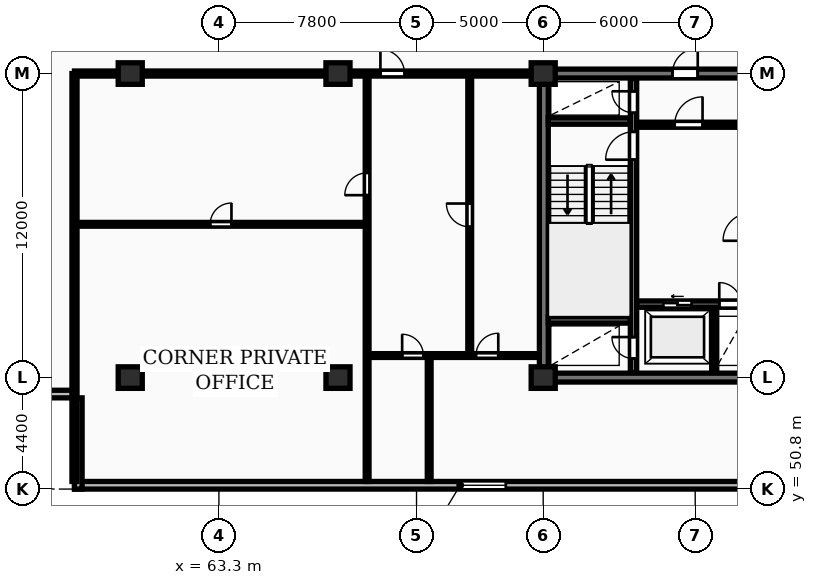
"""IFC4 building model, lengths in metres.
Left out: names, types, materials, properties, quantities, classifications, styles, units other than length and angle.
Written with IfcOpenShell. Run it as: python <this file> out.ifc"""

import sys

from ifc_helpers import new_model, si_unit, direction, frame, frame_2d, origin, origin_2d, place, context, subcontext, project, spatial, rectangle, extrude, element, fill, save


model = new_model("IFC4")
c1 = context("Model", 3, precision=1e-05, world=origin(), true_north=direction((0.0, 1.0)))
c2 = subcontext(c1, "Body", "Model", "MODEL_VIEW")
j1 = project(units=[si_unit("LENGTHUNIT", "METRE"), si_unit("PLANEANGLEUNIT", "RADIAN")], contexts=[c1])
p1 = place(None, origin())
s1 = spatial("IfcSite", under=j1, at=p1, CompositionType="ELEMENT")
p2 = place(p1, origin())
s2 = spatial("IfcBuilding", under=s1, at=p2, CompositionType="ELEMENT")
p3 = place(p2, frame((0.0, 0.0, 113.3)))
s3 = spatial("IfcBuildingStorey", under=s2, at=p3, CompositionType="ELEMENT", Elevation=113.3)
for number, where, z_axis, x_axis in (
    (1, (59.8, 55.2, 0.0), (0.0, 0.0, 1.0), (1.0, 0.0, 0.0)),
    (2, (59.8, 67.2, 0.0), (0.0, 0.0, 1.0), (1.0, 0.0, 0.0)),
    (3, (68.0, 55.2, 0.0), (0.0, 0.0, 1.0), (1.0, 0.0, 0.0)),
    (4, (68.0, 67.2, 0.0), (0.0, 0.0, 1.0), (1.0, 0.0, 0.0)),
    (5, (76.1, 55.2, 0.0), (0.0, 0.0, 1.0), (1.0, 0.0, 0.0)),
    (6, (76.1, 67.2, 0.0), (0.0, 0.0, 1.0), (1.0, 0.0, 0.0)),
):
    element("IfcColumn", number, at=place(p3, frame(where, z_axis=z_axis, x_axis=x_axis)), inside=s3, PredefinedType="COLUMN", context=c2, shape_type="SweptSolid", body=[
        extrude(rectangle(XDim=0.95, YDim=0.85, at=origin_2d()), origin(), (0.0, 0.0, 1.0), 3.25),
    ])
p4 = place(p3, frame((57.6, 50.95, 0.0), z_axis=(0.0, 0.0, 1.0), x_axis=(1.0, 0.0, 0.0)))
e7 = element("IfcWall", 7, at=p4, inside=s3, PredefinedType="STANDARD", context=c2, shape_type="SweptSolid", body=[
    extrude(rectangle(XDim=73.0, YDim=0.3, at=frame_2d((36.5, 0.0))), origin(), (0.0, 0.0, 1.0), 2.97),
])
p5 = place(p4, frame((15.225, 0.0, 0.85)))
e8 = element("IfcOpeningElement", 8, at=p5, cuts=e7, PredefinedType="OPENING", context=c2, shape_type="SweptSolid", body=[
    extrude(rectangle(XDim=1.8, YDim=1.8, at=frame_2d((0.9, 0.9))), frame((0.0, 0.16, 0.0), z_axis=(0.0, -1.0, 0.0), x_axis=(1.0, 0.0, 0.0)), (0.0, 0.0, 1.0), 0.32),
])
p6 = place(p4, frame((58.575, 0.0, 0.85)))
e9 = element("IfcOpeningElement", 9, at=p6, cuts=e7, PredefinedType="OPENING", context=c2, shape_type="SweptSolid", body=[
    extrude(rectangle(XDim=1.8, YDim=1.8, at=frame_2d((0.9, 0.9))), frame((0.0, 0.16, 0.0), z_axis=(0.0, -1.0, 0.0), x_axis=(1.0, 0.0, 0.0)), (0.0, 0.0, 1.0), 0.32),
])
p7 = place(p3, frame((54.0, 54.55, 0.0), z_axis=(0.0, 0.0, 1.0), x_axis=(1.0, 0.0, 0.0)))
e10 = element("IfcWall", 10, at=p7, inside=s3, PredefinedType="STANDARD", context=c2, shape_type="SweptSolid", body=[
    extrude(rectangle(XDim=3.6, YDim=0.3, at=frame_2d((1.8, 0.0))), origin(), (0.0, 0.0, 1.0), 2.97),
])
p8 = place(p3, frame((57.75, 54.4, 0.0), z_axis=(0.0, 0.0, 1.0), x_axis=(0.0, -1.0, 0.0)))
e11 = element("IfcWall", 11, at=p8, inside=s3, PredefinedType="STANDARD", context=c2, shape_type="SweptSolid", body=[
    extrude(rectangle(XDim=3.6, YDim=0.3, at=frame_2d((1.8, 0.0))), origin(), (0.0, 0.0, 1.0), 2.97),
])
p9 = place(p3, frame((75.95, 55.2, 0.0), z_axis=(0.0, 0.0, 1.0), x_axis=(1.0, 0.0, 0.0)))
e12 = element("IfcWall", 12, at=p9, inside=s3, PredefinedType="SHEAR", context=c2, shape_type="SweptSolid", body=[
    extrude(rectangle(XDim=36.3, YDim=0.35, at=frame_2d((18.15, 0.0))), origin(), (0.0, 0.0, 1.0), 3.25),
])
p10 = place(p3, frame((76.125, 55.375, 0.0), z_axis=(0.0, 0.0, 1.0), x_axis=(0.0, 1.0, 0.0)))
e13 = element("IfcWall", 13, at=p10, inside=s3, PredefinedType="SHEAR", context=c2, shape_type="SweptSolid", body=[
    extrude(rectangle(XDim=11.65, YDim=0.35, at=frame_2d((5.825, 0.0))), origin(), (0.0, 0.0, 1.0), 3.25),
])
p11 = place(p3, frame((75.95, 67.2, 0.0), z_axis=(0.0, 0.0, 1.0), x_axis=(1.0, 0.0, 0.0)))
e14 = element("IfcWall", 14, at=p11, inside=s3, PredefinedType="SHEAR", context=c2, shape_type="SweptSolid", body=[
    extrude(rectangle(XDim=36.3, YDim=0.35, at=frame_2d((18.15, 0.0))), origin(), (0.0, 0.0, 1.0), 3.25),
])
p12 = place(p11, frame((5.25, 0.0, 0.0)))
e15 = element("IfcOpeningElement", 15, at=p12, cuts=e14, PredefinedType="OPENING", context=c2, shape_type="SweptSolid", body=[
    extrude(rectangle(XDim=1.0, YDim=2.15, at=frame_2d((0.5, 1.075))), frame((0.0, 0.185, 0.0), z_axis=(0.0, -1.0, 0.0), x_axis=(1.0, 0.0, 0.0)), (0.0, 0.0, 1.0), 0.37),
])
p13 = place(p11, frame((21.6, 0.0, 0.0)))
e16 = element("IfcOpeningElement", 16, at=p13, cuts=e14, PredefinedType="OPENING", context=c2, shape_type="SweptSolid", body=[
    extrude(rectangle(XDim=1.5, YDim=2.2, at=frame_2d((0.75, 1.1))), frame((0.0, 0.185, 0.0), z_axis=(0.0, -1.0, 0.0), x_axis=(1.0, 0.0, 0.0)), (0.0, 0.0, 1.0), 0.37),
])
p14 = place(p11, frame((30.45, 0.0, 0.0)))
e17 = element("IfcOpeningElement", 17, at=p14, cuts=e14, PredefinedType="OPENING", context=c2, shape_type="SweptSolid", body=[
    extrude(rectangle(XDim=1.0, YDim=2.15, at=frame_2d((0.5, 1.075))), frame((0.0, 0.185, 0.0), z_axis=(0.0, -1.0, 0.0), x_axis=(1.0, 0.0, 0.0)), (0.0, 0.0, 1.0), 0.37),
])
p15 = place(p3, frame((79.665, 55.4, 0.0), z_axis=(0.0, 0.0, 1.0), x_axis=(0.0, 1.0, 0.0)))
e18 = element("IfcWall", 18, at=p15, inside=s3, PredefinedType="SHEAR", context=c2, shape_type="SweptSolid", body=[
    extrude(rectangle(XDim=11.6, YDim=0.25, at=frame_2d((5.8, 0.0))), origin(), (0.0, 0.0, 1.0), 3.25),
])
p16 = place(p15, frame((0.55, 0.0, 0.0)))
e19 = element("IfcOpeningElement", 19, at=p16, cuts=e18, PredefinedType="OPENING", context=c2, shape_type="SweptSolid", body=[
    extrude(rectangle(XDim=0.85, YDim=2.05, at=frame_2d((0.425, 1.025))), frame((0.0, 0.135, 0.0), z_axis=(0.0, -1.0, 0.0), x_axis=(1.0, 0.0, 0.0)), (0.0, 0.0, 1.0), 0.27),
])
p17 = place(p15, frame((8.4, 0.0, 0.0)))
e20 = element("IfcOpeningElement", 20, at=p17, cuts=e18, PredefinedType="OPENING", context=c2, shape_type="SweptSolid", body=[
    extrude(rectangle(XDim=1.1, YDim=2.1, at=frame_2d((0.55, 1.05))), frame((0.0, 0.135, 0.0), z_axis=(0.0, -1.0, 0.0), x_axis=(1.0, 0.0, 0.0)), (0.0, 0.0, 1.0), 0.27),
])
p18 = place(p15, frame((10.25, 0.0, 0.0)))
e21 = element("IfcOpeningElement", 21, at=p18, cuts=e18, PredefinedType="OPENING", context=c2, shape_type="SweptSolid", body=[
    extrude(rectangle(XDim=0.85, YDim=2.05, at=frame_2d((0.425, 1.025))), frame((0.0, 0.135, 0.0), z_axis=(0.0, -1.0, 0.0), x_axis=(1.0, 0.0, 0.0)), (0.0, 0.0, 1.0), 0.27),
])
for number, where, z_axis, x_axis in (
    (22, (76.3, 57.475, 0.0), (0.0, 0.0, 1.0), (1.0, 0.0, 0.0)),
    (23, (76.3, 65.325, 0.0), (0.0, 0.0, 1.0), (1.0, 0.0, 0.0)),
):
    element("IfcWall", number, at=place(p3, frame(where, z_axis=z_axis, x_axis=x_axis)), inside=s3, PredefinedType="SHEAR", context=c2, shape_type="SweptSolid", body=[
        extrude(rectangle(XDim=3.24, YDim=0.25, at=frame_2d((1.62, 0.0))), origin(), (0.0, 0.0, 1.0), 3.25),
    ])
p19 = place(p3, frame((79.79, 58.1, 0.0), z_axis=(0.0, 0.0, 1.0), x_axis=(1.0, 0.0, 0.0)))
e24 = element("IfcWall", 24, at=p19, inside=s3, PredefinedType="SHEAR", context=c2, shape_type="SweptSolid", body=[
    extrude(rectangle(XDim=4.39, YDim=0.25, at=frame_2d((2.195, 0.0))), origin(), (0.0, 0.0, 1.0), 3.25),
])
p20 = place(p19, frame((1.05, 0.0, 0.0)))
e25 = element("IfcOpeningElement", 25, at=p20, cuts=e24, PredefinedType="OPENING", context=c2, shape_type="SweptSolid", body=[
    extrude(rectangle(XDim=1.12, YDim=2.12, at=frame_2d((0.56, 1.06))), frame((0.0, 0.135, 0.0), z_axis=(0.0, -1.0, 0.0), x_axis=(1.0, 0.0, 0.0)), (0.0, 0.0, 1.0), 0.27),
])
p21 = place(p19, frame((3.26, 0.0, 0.0)))
e26 = element("IfcOpeningElement", 26, at=p21, cuts=e24, PredefinedType="OPENING", context=c2, shape_type="SweptSolid", body=[
    extrude(rectangle(XDim=0.85, YDim=2.05, at=frame_2d((0.425, 1.025))), frame((0.0, 0.135, 0.0), z_axis=(0.0, -1.0, 0.0), x_axis=(1.0, 0.0, 0.0)), (0.0, 0.0, 1.0), 0.27),
])
p22 = place(p3, frame((82.85, 55.4, 0.0), z_axis=(0.0, 0.0, 1.0), x_axis=(0.0, 1.0, 0.0)))
e27 = element("IfcWall", 27, at=p22, inside=s3, PredefinedType="PARTITIONING", context=c2, shape_type="SweptSolid", body=[
    extrude(rectangle(XDim=2.56, YDim=0.2, at=frame_2d((1.28, 0.0))), origin(), (0.0, 0.0, 1.0), 2.97),
])
p23 = place(p3, frame((79.79, 65.18, 0.0), z_axis=(0.0, 0.0, 1.0), x_axis=(1.0, 0.0, 0.0)))
e28 = element("IfcWall", 28, at=p23, inside=s3, PredefinedType="PARTITIONING", context=c2, shape_type="SweptSolid", body=[
    extrude(rectangle(XDim=4.39, YDim=0.2, at=frame_2d((2.195, 0.0))), origin(), (0.0, 0.0, 1.0), 2.97),
])
p24 = place(p23, frame((1.5, 0.0, 0.0)))
e29 = element("IfcOpeningElement", 29, at=p24, cuts=e28, PredefinedType="OPENING", context=c2, shape_type="SweptSolid", body=[
    extrude(rectangle(XDim=1.1, YDim=2.1, at=frame_2d((0.55, 1.05))), frame((0.0, 0.11, 0.0), z_axis=(0.0, -1.0, 0.0), x_axis=(1.0, 0.0, 0.0)), (0.0, 0.0, 1.0), 0.22),
])
p25 = place(p3, frame((57.6, 51.1, 0.0), z_axis=(0.0, 0.0, 1.0), x_axis=(0.0, 1.0, 0.0)))
e30 = element("IfcWall", 30, at=p25, inside=s3, PredefinedType="PARTITIONING", context=c2, shape_type="SweptSolid", body=[
    extrude(rectangle(XDim=16.1, YDim=0.2, at=frame_2d((8.05, 0.0))), origin(), (0.0, 0.0, 1.0), 2.97),
])
p26 = place(p3, frame((57.6, 61.25, 0.0), z_axis=(0.0, 0.0, 1.0), x_axis=(1.0, 0.0, 0.0)))
e31 = element("IfcWall", 31, at=p26, inside=s3, PredefinedType="PARTITIONING", context=c2, shape_type="SweptSolid", body=[
    extrude(rectangle(XDim=11.55, YDim=0.15, at=frame_2d((5.775, 0.0))), origin(), (0.0, 0.0, 1.0), 2.97),
])
p27 = place(p26, frame((5.355, 0.0, 0.0)))
e32 = element("IfcOpeningElement", 32, at=p27, cuts=e31, PredefinedType="OPENING", context=c2, shape_type="SweptSolid", body=[
    extrude(rectangle(XDim=0.84, YDim=2.04, at=frame_2d((0.42, 1.02))), frame((0.0, 0.085, 0.0), z_axis=(0.0, -1.0, 0.0), x_axis=(1.0, 0.0, 0.0)), (0.0, 0.0, 1.0), 0.17),
])
p28 = place(p3, frame((69.15, 51.1, 0.0), z_axis=(0.0, 0.0, 1.0), x_axis=(0.0, 1.0, 0.0)))
e33 = element("IfcWall", 33, at=p28, inside=s3, PredefinedType="PARTITIONING", context=c2, shape_type="SweptSolid", body=[
    extrude(rectangle(XDim=16.05, YDim=0.15, at=frame_2d((8.025, 0.0))), origin(), (0.0, 0.0, 1.0), 2.97),
])
p29 = place(p28, frame((11.3, 0.0, 0.0)))
e34 = element("IfcOpeningElement", 34, at=p29, cuts=e33, PredefinedType="OPENING", context=c2, shape_type="SweptSolid", body=[
    extrude(rectangle(XDim=0.88, YDim=2.06, at=frame_2d((0.44, 1.03))), frame((0.0, 0.085, 0.0), z_axis=(0.0, -1.0, 0.0), x_axis=(1.0, 0.0, 0.0)), (0.0, 0.0, 1.0), 0.17),
])
p30 = place(p3, frame((73.2, 56.07, 0.0), z_axis=(0.0, 0.0, 1.0), x_axis=(0.0, 1.0, 0.0)))
e35 = element("IfcWall", 35, at=p30, inside=s3, PredefinedType="PARTITIONING", context=c2, shape_type="SweptSolid", body=[
    extrude(rectangle(XDim=11.08, YDim=0.15, at=frame_2d((5.54, 0.0))), origin(), (0.0, 0.0, 1.0), 2.97),
])
p31 = place(p30, frame((5.08, 0.0, 0.0)))
e36 = element("IfcOpeningElement", 36, at=p31, cuts=e35, PredefinedType="OPENING", context=c2, shape_type="SweptSolid", body=[
    extrude(rectangle(XDim=0.92, YDim=2.08, at=frame_2d((0.46, 1.04))), frame((0.0, 0.085, 0.0), z_axis=(0.0, -1.0, 0.0), x_axis=(1.0, 0.0, 0.0)), (0.0, 0.0, 1.0), 0.17),
])
p32 = place(p3, frame((71.6, 51.1, 0.0), z_axis=(0.0, 0.0, 1.0), x_axis=(0.0, 1.0, 0.0)))
e37 = element("IfcWall", 37, at=p32, inside=s3, PredefinedType="PARTITIONING", context=c2, shape_type="SweptSolid", body=[
    extrude(rectangle(XDim=4.97, YDim=0.15, at=frame_2d((2.485, 0.0))), origin(), (0.0, 0.0, 1.0), 2.97),
])
p33 = place(p3, frame((69.17, 56.07, 0.0), z_axis=(0.0, 0.0, 1.0), x_axis=(1.0, 0.0, 0.0)))
e38 = element("IfcWall", 38, at=p33, inside=s3, PredefinedType="PARTITIONING", context=c2, shape_type="SweptSolid", body=[
    extrude(rectangle(XDim=6.76, YDim=0.15, at=frame_2d((3.38, 0.0))), origin(), (0.0, 0.0, 1.0), 2.97),
])
p34 = place(p33, frame((1.362, 0.0, 0.0)))
e39 = element("IfcOpeningElement", 39, at=p34, cuts=e38, PredefinedType="OPENING", context=c2, shape_type="SweptSolid", body=[
    extrude(rectangle(XDim=0.84, YDim=2.04, at=frame_2d((0.42, 1.02))), frame((0.0, 0.085, 0.0), z_axis=(0.0, -1.0, 0.0), x_axis=(1.0, 0.0, 0.0)), (0.0, 0.0, 1.0), 0.17),
])
p35 = place(p33, frame((4.277, 0.0, 0.0)))
e40 = element("IfcOpeningElement", 40, at=p35, cuts=e38, PredefinedType="OPENING", context=c2, shape_type="SweptSolid", body=[
    extrude(rectangle(XDim=0.88, YDim=2.06, at=frame_2d((0.44, 1.03))), frame((0.0, 0.085, 0.0), z_axis=(0.0, -1.0, 0.0), x_axis=(1.0, 0.0, 0.0)), (0.0, 0.0, 1.0), 0.17),
])
p36 = place(p3, frame((57.6, 67.2, 0.0), z_axis=(0.0, 0.0, 1.0), x_axis=(1.0, 0.0, 0.0)))
e41 = element("IfcWall", 41, at=p36, inside=s3, PredefinedType="PARTITIONING", context=c2, shape_type="SweptSolid", body=[
    extrude(rectangle(XDim=18.35, YDim=0.2, at=frame_2d((9.175, 0.0))), origin(), (0.0, 0.0, 1.0), 2.433),
])
p37 = place(p36, frame((12.075, 0.0, 0.0)))
e42 = element("IfcOpeningElement", 42, at=p37, cuts=e41, PredefinedType="OPENING", context=c2, shape_type="SweptSolid", body=[
    extrude(rectangle(XDim=0.95, YDim=2.15, at=frame_2d((0.475, 1.075))), frame((0.0, 0.11, 0.0), z_axis=(0.0, -1.0, 0.0), x_axis=(1.0, 0.0, 0.0)), (0.0, 0.0, 1.0), 0.22),
])
p38 = place(p5, origin())
e43 = element("IfcWindow", 43, at=p38, inside=s3, PartitioningType="SINGLE_PANEL", PredefinedType="WINDOW", context=c2, shape_type="SweptSolid", body=[
    extrude(rectangle(XDim=1.8, YDim=1.8, at=frame_2d((0.9, 0.9))), frame((0.0, 0.03, 0.0), z_axis=(0.0, -1.0, 0.0), x_axis=(1.0, 0.0, 0.0)), (0.0, 0.0, 1.0), 0.06),
])
fill(e8, e43)
p39 = place(p12, origin())
e44 = element("IfcDoor", 44, at=p39, inside=s3, OperationType="SINGLE_SWING_RIGHT", PredefinedType="DOOR", context=c2, shape_type="SweptSolid", body=[
    extrude(rectangle(XDim=1.0, YDim=2.15, at=frame_2d((0.5, 1.075))), frame((0.0, 0.025, 0.0), z_axis=(0.0, -1.0, 0.0), x_axis=(1.0, 0.0, 0.0)), (0.0, 0.0, 1.0), 0.05),
])
fill(e15, e44)
p40 = place(p16, origin())
e45 = element("IfcDoor", 45, at=p40, inside=s3, OperationType="SINGLE_SWING_RIGHT", PredefinedType="DOOR", context=c2, shape_type="SweptSolid", body=[
    extrude(rectangle(XDim=0.85, YDim=2.05, at=frame_2d((0.425, 1.025))), frame((0.0, 0.025, 0.0), z_axis=(0.0, -1.0, 0.0), x_axis=(1.0, 0.0, 0.0)), (0.0, 0.0, 1.0), 0.05),
])
fill(e19, e45)
p41 = place(p17, origin())
e46 = element("IfcDoor", 46, at=p41, inside=s3, OperationType="SINGLE_SWING_LEFT", PredefinedType="DOOR", context=c2, shape_type="SweptSolid", body=[
    extrude(rectangle(XDim=1.1, YDim=2.1, at=frame_2d((0.55, 1.05))), frame((0.0, 0.025, 0.0), z_axis=(0.0, -1.0, 0.0), x_axis=(1.0, 0.0, 0.0)), (0.0, 0.0, 1.0), 0.05),
])
fill(e20, e46)
p42 = place(p18, origin())
e47 = element("IfcDoor", 47, at=p42, inside=s3, OperationType="SINGLE_SWING_RIGHT", PredefinedType="DOOR", context=c2, shape_type="SweptSolid", body=[
    extrude(rectangle(XDim=0.85, YDim=2.05, at=frame_2d((0.425, 1.025))), frame((0.0, 0.025, 0.0), z_axis=(0.0, -1.0, 0.0), x_axis=(1.0, 0.0, 0.0)), (0.0, 0.0, 1.0), 0.05),
])
fill(e21, e47)
p43 = place(p20, origin())
e48 = element("IfcDoor", 48, at=p43, inside=s3, OperationType="SLIDING_TO_LEFT", PredefinedType="DOOR", context=c2, shape_type="SweptSolid", body=[
    extrude(rectangle(XDim=1.12, YDim=2.12, at=frame_2d((0.56, 1.06))), frame((0.0, 0.025, 0.0), z_axis=(0.0, -1.0, 0.0), x_axis=(1.0, 0.0, 0.0)), (0.0, 0.0, 1.0), 0.05),
])
fill(e25, e48)
p44 = place(p21, origin())
e49 = element("IfcDoor", 49, at=p44, inside=s3, OperationType="SINGLE_SWING_LEFT", PredefinedType="DOOR", context=c2, shape_type="SweptSolid", body=[
    extrude(rectangle(XDim=0.85, YDim=2.05, at=frame_2d((0.425, 1.025))), frame((0.0, 0.025, 0.0), z_axis=(0.0, -1.0, 0.0), x_axis=(1.0, 0.0, 0.0)), (0.0, 0.0, 1.0), 0.05),
])
fill(e26, e49)
p45 = place(p24, origin())
e50 = element("IfcDoor", 50, at=p45, inside=s3, OperationType="SINGLE_SWING_RIGHT", PredefinedType="DOOR", context=c2, shape_type="SweptSolid", body=[
    extrude(rectangle(XDim=1.1, YDim=2.1, at=frame_2d((0.55, 1.05))), frame((0.0, 0.025, 0.0), z_axis=(0.0, -1.0, 0.0), x_axis=(1.0, 0.0, 0.0)), (0.0, 0.0, 1.0), 0.05),
])
fill(e29, e50)
p46 = place(p27, origin())
e51 = element("IfcDoor", 51, at=p46, inside=s3, OperationType="SINGLE_SWING_RIGHT", PredefinedType="DOOR", context=c2, shape_type="SweptSolid", body=[
    extrude(rectangle(XDim=0.84, YDim=2.04, at=frame_2d((0.42, 1.02))), frame((0.0, 0.025, 0.0), z_axis=(0.0, -1.0, 0.0), x_axis=(1.0, 0.0, 0.0)), (0.0, 0.0, 1.0), 0.05),
])
fill(e32, e51)
p47 = place(p29, origin())
e52 = element("IfcDoor", 52, at=p47, inside=s3, OperationType="SINGLE_SWING_LEFT", PredefinedType="DOOR", context=c2, shape_type="SweptSolid", body=[
    extrude(rectangle(XDim=0.88, YDim=2.06, at=frame_2d((0.44, 1.03))), frame((0.0, 0.025, 0.0), z_axis=(0.0, -1.0, 0.0), x_axis=(1.0, 0.0, 0.0)), (0.0, 0.0, 1.0), 0.05),
])
fill(e34, e52)
p48 = place(p31, origin())
e53 = element("IfcDoor", 53, at=p48, inside=s3, OperationType="SINGLE_SWING_RIGHT", PredefinedType="DOOR", context=c2, shape_type="SweptSolid", body=[
    extrude(rectangle(XDim=0.92, YDim=2.08, at=frame_2d((0.46, 1.04))), frame((0.0, 0.025, 0.0), z_axis=(0.0, -1.0, 0.0), x_axis=(1.0, 0.0, 0.0)), (0.0, 0.0, 1.0), 0.05),
])
fill(e36, e53)
p49 = place(p34, origin())
e54 = element("IfcDoor", 54, at=p49, inside=s3, OperationType="SINGLE_SWING_LEFT", PredefinedType="DOOR", context=c2, shape_type="SweptSolid", body=[
    extrude(rectangle(XDim=0.84, YDim=2.04, at=frame_2d((0.42, 1.02))), frame((0.0, 0.025, 0.0), z_axis=(0.0, -1.0, 0.0), x_axis=(1.0, 0.0, 0.0)), (0.0, 0.0, 1.0), 0.05),
])
fill(e39, e54)
p50 = place(p35, origin())
e55 = element("IfcDoor", 55, at=p50, inside=s3, OperationType="SINGLE_SWING_RIGHT", PredefinedType="DOOR", context=c2, shape_type="SweptSolid", body=[
    extrude(rectangle(XDim=0.88, YDim=2.06, at=frame_2d((0.44, 1.03))), frame((0.0, 0.025, 0.0), z_axis=(0.0, -1.0, 0.0), x_axis=(1.0, 0.0, 0.0)), (0.0, 0.0, 1.0), 0.05),
])
fill(e40, e55)
p51 = place(p37, origin())
e56 = element("IfcDoor", 56, at=p51, inside=s3, OperationType="SINGLE_SWING_LEFT", PredefinedType="DOOR", context=c2, shape_type="SweptSolid", body=[
    extrude(rectangle(XDim=0.95, YDim=2.15, at=frame_2d((0.475, 1.075))), frame((0.0, 0.025, 0.0), z_axis=(0.0, -1.0, 0.0), x_axis=(1.0, 0.0, 0.0)), (0.0, 0.0, 1.0), 0.05),
])
fill(e42, e56)
save(model, sys.argv[1])
